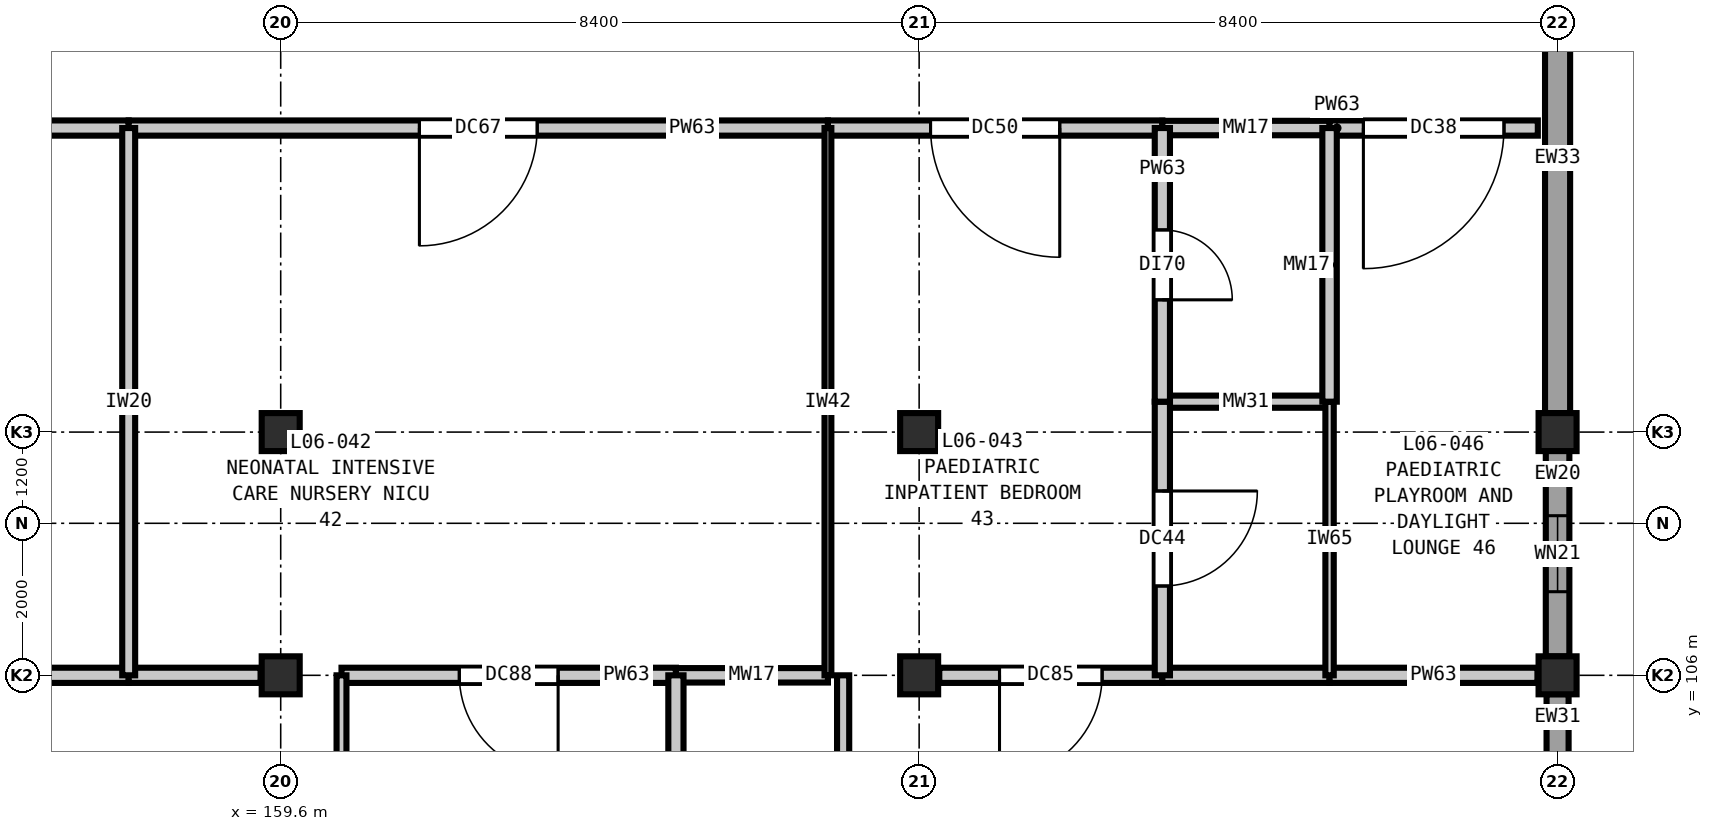
"""IFC4 building model, lengths in metres.
Left out: names, types, materials, properties, quantities, classifications, styles, units other than length and angle.
Written with IfcOpenShell. Run it as: python <this file> out.ifc"""

import sys

from ifc_helpers import new_model, si_unit, direction, frame, frame_2d, origin, origin_2d, place, context, subcontext, project, spatial, rectangle, extrude, element, fill, save


model = new_model("IFC4")
c1 = context("Model", 3, precision=1e-05, world=origin(), true_north=direction((0.0, 1.0)))
c2 = subcontext(c1, "Body", "Model", "MODEL_VIEW")
j1 = project(units=[si_unit("LENGTHUNIT", "METRE"), si_unit("PLANEANGLEUNIT", "RADIAN")], contexts=[c1])
p1 = place(None, origin())
s1 = spatial("IfcSite", under=j1, at=p1, CompositionType="ELEMENT")
p2 = place(p1, origin())
s2 = spatial("IfcBuilding", under=s1, at=p2, CompositionType="ELEMENT")
p3 = place(p2, frame((0.0, 0.0, 28.8)))
s3 = spatial("IfcBuildingStorey", under=s2, at=p3, CompositionType="ELEMENT", Elevation=28.8)
for number, where, z_axis, x_axis in (
    (1, (159.6, 106.0, 0.0), (0.0, 0.0, 1.0), (1.0, 0.0, 0.0)),
    (2, (159.6, 109.2, 0.0), (0.0, 0.0, 1.0), (1.0, 0.0, 0.0)),
    (3, (168.0, 106.0, 0.0), (0.0, 0.0, 1.0), (1.0, 0.0, 0.0)),
    (4, (168.0, 109.2, 0.0), (0.0, 0.0, 1.0), (1.0, 0.0, 0.0)),
    (5, (176.4, 106.0, 0.0), (0.0, 0.0, 1.0), (1.0, 0.0, 0.0)),
    (6, (176.4, 109.2, 0.0), (0.0, 0.0, 1.0), (1.0, 0.0, 0.0)),
):
    element("IfcColumn", number, at=place(p3, frame(where, z_axis=z_axis, x_axis=x_axis)), inside=s3, PredefinedType="COLUMN", context=c2, shape_type="SweptSolid", body=[
        extrude(rectangle(XDim=0.5, YDim=0.5, at=origin_2d()), origin(), (0.0, 0.0, 1.0), 4.2),
    ])
p4 = place(p3, frame((176.4, 116.152, 0.0), z_axis=(0.0, 0.0, 1.0), x_axis=(0.0, -1.0, 0.0)))
e7 = element("IfcWall", 7, at=p4, inside=s3, PredefinedType="SOLIDWALL", context=c2, shape_type="SweptSolid", body=[
    extrude(rectangle(XDim=6.704, YDim=0.33, at=frame_2d((3.352, 0.0))), origin(), (0.0, 0.0, 1.0), 3.48),
])
p5 = place(p3, frame((176.4, 108.952, 0.0), z_axis=(0.0, 0.0, 1.0), x_axis=(0.0, -1.0, 0.0)))
e8 = element("IfcWall", 8, at=p5, inside=s3, PredefinedType="SOLIDWALL", context=c2, shape_type="SweptSolid", body=[
    extrude(rectangle(XDim=2.704, YDim=0.31, at=frame_2d((1.352, 0.0))), origin(), (0.0, 0.0, 1.0), 3.48),
])
p6 = place(p5, frame((0.852, 0.0, 0.9)))
e9 = element("IfcOpeningElement", 9, at=p6, cuts=e8, PredefinedType="OPENING", context=c2, shape_type="SweptSolid", body=[
    extrude(rectangle(XDim=1.0, YDim=1.55, at=frame_2d((0.5, 0.775))), frame((0.0, 0.165, 0.0), z_axis=(0.0, -1.0, 0.0), x_axis=(1.0, 0.0, 0.0)), (0.0, 0.0, 1.0), 0.33),
])
p7 = place(p3, frame((176.4, 105.752, 0.0), z_axis=(0.0, 0.0, 1.0), x_axis=(0.0, -1.0, 0.0)))
e10 = element("IfcWall", 10, at=p7, inside=s3, PredefinedType="SOLIDWALL", context=c2, shape_type="SweptSolid", body=[
    extrude(rectangle(XDim=2.704, YDim=0.29, at=frame_2d((1.352, 0.0))), origin(), (0.0, 0.0, 1.0), 3.48),
])
p8 = place(p7, frame((0.852, 0.0, 0.9)))
e11 = element("IfcOpeningElement", 11, at=p8, cuts=e10, PredefinedType="OPENING", context=c2, shape_type="SweptSolid", body=[
    extrude(rectangle(XDim=1.0, YDim=1.55, at=frame_2d((0.5, 0.775))), frame((0.0, 0.155, 0.0), z_axis=(0.0, -1.0, 0.0), x_axis=(1.0, 0.0, 0.0)), (0.0, 0.0, 1.0), 0.31),
])
p9 = place(p3, frame((151.465, 106.0, 0.0), z_axis=(0.0, 0.0, 1.0), x_axis=(1.0, 0.0, 0.0)))
e12 = element("IfcWall", 12, at=p9, inside=s3, PredefinedType="PARTITIONING", context=c2, shape_type="SweptSolid", body=[
    extrude(rectangle(XDim=6.135, YDim=0.2, at=frame_2d((3.067, 0.0))), origin(), (0.0, 0.0, 1.0), 3.635),
])
p10 = place(p9, frame((2.442, 0.0, 0.0)))
e13 = element("IfcOpeningElement", 13, at=p10, cuts=e12, PredefinedType="OPENING", context=c2, shape_type="SweptSolid", body=[
    extrude(rectangle(XDim=1.25, YDim=2.15, at=frame_2d((0.625, 1.075))), frame((0.0, 0.11, 0.0), z_axis=(0.0, -1.0, 0.0), x_axis=(1.0, 0.0, 0.0)), (0.0, 0.0, 1.0), 0.22),
])
p11 = place(p3, frame((157.6, 106.0, 0.0), z_axis=(0.0, 0.0, 1.0), x_axis=(1.0, 0.0, 0.0)))
e14 = element("IfcWall", 14, at=p11, inside=s3, PredefinedType="PARTITIONING", context=c2, shape_type="SweptSolid", body=[
    extrude(rectangle(XDim=1.735, YDim=0.2, at=frame_2d((0.867, 0.0))), origin(), (0.0, 0.0, 1.0), 3.635),
])
p12 = place(p3, frame((160.4, 106.0, 0.0), z_axis=(0.0, 0.0, 1.0), x_axis=(1.0, 0.0, 0.0)))
e15 = element("IfcWall", 15, at=p12, inside=s3, PredefinedType="PARTITIONING", context=c2, shape_type="SweptSolid", body=[
    extrude(rectangle(XDim=4.4, YDim=0.2, at=frame_2d((2.2, 0.0))), origin(), (0.0, 0.0, 1.0), 3.635),
])
p13 = place(p12, frame((1.55, 0.0, 0.0)))
e16 = element("IfcOpeningElement", 16, at=p13, cuts=e15, PredefinedType="OPENING", context=c2, shape_type="SweptSolid", body=[
    extrude(rectangle(XDim=1.3, YDim=2.2, at=frame_2d((0.65, 1.1))), frame((0.0, 0.11, 0.0), z_axis=(0.0, -1.0, 0.0), x_axis=(1.0, 0.0, 0.0)), (0.0, 0.0, 1.0), 0.22),
])
p14 = place(p3, frame((164.8, 106.0, 0.0), z_axis=(0.0, 0.0, 1.0), x_axis=(1.0, 0.0, 0.0)))
e17 = element("IfcWall", 17, at=p14, inside=s3, PredefinedType="PLUMBINGWALL", context=c2, shape_type="SweptSolid", body=[
    extrude(rectangle(XDim=2.0, YDim=0.19, at=frame_2d((1.0, 0.0))), origin(), (0.0, 0.0, 1.0), 3.635),
])
p15 = place(p3, frame((168.265, 106.0, 0.0), z_axis=(0.0, 0.0, 1.0), x_axis=(1.0, 0.0, 0.0)))
e18 = element("IfcWall", 18, at=p15, inside=s3, PredefinedType="PARTITIONING", context=c2, shape_type="SweptSolid", body=[
    extrude(rectangle(XDim=2.935, YDim=0.2, at=frame_2d((1.468, 0.0))), origin(), (0.0, 0.0, 1.0), 3.635),
])
p16 = place(p15, frame((0.792, 0.0, 0.0)))
e19 = element("IfcOpeningElement", 19, at=p16, cuts=e18, PredefinedType="OPENING", context=c2, shape_type="SweptSolid", body=[
    extrude(rectangle(XDim=1.35, YDim=2.2, at=frame_2d((0.675, 1.1))), frame((0.0, 0.11, 0.0), z_axis=(0.0, -1.0, 0.0), x_axis=(1.0, 0.0, 0.0)), (0.0, 0.0, 1.0), 0.22),
])
p17 = place(p3, frame((171.2, 106.0, 0.0), z_axis=(0.0, 0.0, 1.0), x_axis=(1.0, 0.0, 0.0)))
e20 = element("IfcWall", 20, at=p17, inside=s3, PredefinedType="PARTITIONING", context=c2, shape_type="SweptSolid", body=[
    extrude(rectangle(XDim=2.2, YDim=0.2, at=frame_2d((1.1, 0.0))), origin(), (0.0, 0.0, 1.0), 3.635),
])
p18 = place(p3, frame((173.4, 106.0, 0.0), z_axis=(0.0, 0.0, 1.0), x_axis=(1.0, 0.0, 0.0)))
e21 = element("IfcWall", 21, at=p18, inside=s3, PredefinedType="PARTITIONING", context=c2, shape_type="SweptSolid", body=[
    extrude(rectangle(XDim=2.735, YDim=0.2, at=frame_2d((1.368, 0.0))), origin(), (0.0, 0.0, 1.0), 3.635),
])
p19 = place(p3, frame((171.2, 109.6, 0.0), z_axis=(0.0, 0.0, 1.0), x_axis=(1.0, 0.0, 0.0)))
e22 = element("IfcWall", 22, at=p19, inside=s3, PredefinedType="PLUMBINGWALL", context=c2, shape_type="SweptSolid", body=[
    extrude(rectangle(XDim=2.2, YDim=0.16, at=frame_2d((1.1, 0.0))), origin(), (0.0, 0.0, 1.0), 3.92),
])
p20 = place(p3, frame((149.2, 113.2, 0.0), z_axis=(0.0, 0.0, 1.0), x_axis=(1.0, 0.0, 0.0)))
e23 = element("IfcWall", 23, at=p20, inside=s3, PredefinedType="PARTITIONING", context=c2, shape_type="SweptSolid", body=[
    extrude(rectangle(XDim=8.4, YDim=0.2, at=frame_2d((4.2, 0.0))), origin(), (0.0, 0.0, 1.0), 3.92),
])
p21 = place(p20, frame((3.475, 0.0, 0.0)))
e24 = element("IfcOpeningElement", 24, at=p21, cuts=e23, PredefinedType="OPENING", context=c2, shape_type="SweptSolid", body=[
    extrude(rectangle(XDim=1.45, YDim=2.25, at=frame_2d((0.725, 1.125))), frame((0.0, 0.11, 0.0), z_axis=(0.0, -1.0, 0.0), x_axis=(1.0, 0.0, 0.0)), (0.0, 0.0, 1.0), 0.22),
])
p22 = place(p3, frame((157.6, 113.2, 0.0), z_axis=(0.0, 0.0, 1.0), x_axis=(1.0, 0.0, 0.0)))
e25 = element("IfcWall", 25, at=p22, inside=s3, PredefinedType="PARTITIONING", context=c2, shape_type="SweptSolid", body=[
    extrude(rectangle(XDim=9.2, YDim=0.2, at=frame_2d((4.6, 0.0))), origin(), (0.0, 0.0, 1.0), 3.92),
])
p23 = place(p22, frame((3.825, 0.0, 0.0)))
e26 = element("IfcOpeningElement", 26, at=p23, cuts=e25, PredefinedType="OPENING", context=c2, shape_type="SweptSolid", body=[
    extrude(rectangle(XDim=1.55, YDim=2.25, at=frame_2d((0.775, 1.125))), frame((0.0, 0.11, 0.0), z_axis=(0.0, -1.0, 0.0), x_axis=(1.0, 0.0, 0.0)), (0.0, 0.0, 1.0), 0.22),
])
p24 = place(p3, frame((166.8, 113.2, 0.0), z_axis=(0.0, 0.0, 1.0), x_axis=(1.0, 0.0, 0.0)))
e27 = element("IfcWall", 27, at=p24, inside=s3, PredefinedType="PARTITIONING", context=c2, shape_type="SweptSolid", body=[
    extrude(rectangle(XDim=4.4, YDim=0.2, at=frame_2d((2.2, 0.0))), origin(), (0.0, 0.0, 1.0), 3.92),
])
p25 = place(p24, frame((1.35, 0.0, 0.0)))
e28 = element("IfcOpeningElement", 28, at=p25, cuts=e27, PredefinedType="OPENING", context=c2, shape_type="SweptSolid", body=[
    extrude(rectangle(XDim=1.7, YDim=2.3, at=frame_2d((0.85, 1.15))), frame((0.0, 0.11, 0.0), z_axis=(0.0, -1.0, 0.0), x_axis=(1.0, 0.0, 0.0)), (0.0, 0.0, 1.0), 0.22),
])
p26 = place(p3, frame((171.2, 113.2, 0.0), z_axis=(0.0, 0.0, 1.0), x_axis=(1.0, 0.0, 0.0)))
e29 = element("IfcWall", 29, at=p26, inside=s3, PredefinedType="PLUMBINGWALL", context=c2, shape_type="SweptSolid", body=[
    extrude(rectangle(XDim=2.2, YDim=0.19, at=frame_2d((1.1, 0.0))), origin(), (0.0, 0.0, 1.0), 3.92),
])
p27 = place(p3, frame((173.4, 113.2, 0.0), z_axis=(0.0, 0.0, 1.0), x_axis=(1.0, 0.0, 0.0)))
e30 = element("IfcWall", 30, at=p27, inside=s3, PredefinedType="PARTITIONING", context=c2, shape_type="SweptSolid", body=[
    extrude(rectangle(XDim=2.74, YDim=0.2, at=frame_2d((1.37, 0.0))), origin(), (0.0, 0.0, 1.0), 3.92),
])
p28 = place(p27, frame((0.445, 0.0, 0.0)))
e31 = element("IfcOpeningElement", 31, at=p28, cuts=e30, PredefinedType="OPENING", context=c2, shape_type="SweptSolid", body=[
    extrude(rectangle(XDim=1.85, YDim=2.3, at=frame_2d((0.925, 1.15))), frame((0.0, 0.11, 0.0), z_axis=(0.0, -1.0, 0.0), x_axis=(1.0, 0.0, 0.0)), (0.0, 0.0, 1.0), 0.22),
])
p29 = place(p3, frame((157.6, 106.0, 0.0), z_axis=(0.0, 0.0, 1.0), x_axis=(0.0, 1.0, 0.0)))
e32 = element("IfcWall", 32, at=p29, inside=s3, PredefinedType="PARTITIONING", context=c2, shape_type="SweptSolid", body=[
    extrude(rectangle(XDim=7.2, YDim=0.17, at=frame_2d((3.6, 0.0))), origin(), (0.0, 0.0, 1.0), 3.92),
])
p30 = place(p3, frame((160.4, 91.46, 0.0), z_axis=(0.0, 0.0, 1.0), x_axis=(0.0, 1.0, 0.0)))
e33 = element("IfcWall", 33, at=p30, inside=s3, PredefinedType="PARTITIONING", context=c2, shape_type="SweptSolid", body=[
    extrude(rectangle(XDim=14.54, YDim=0.13, at=frame_2d((7.27, 0.0))), origin(), (0.0, 0.0, 1.0), 3.92),
])
p31 = place(p3, frame((164.8, 98.6, 0.0), z_axis=(0.0, 0.0, 1.0), x_axis=(0.0, 1.0, 0.0)))
e34 = element("IfcWall", 34, at=p31, inside=s3, PredefinedType="PARTITIONING", context=c2, shape_type="SweptSolid", body=[
    extrude(rectangle(XDim=7.4, YDim=0.2, at=frame_2d((3.7, 0.0))), origin(), (0.0, 0.0, 1.0), 3.92),
])
p32 = place(p31, frame((3.24, 0.0, 0.0)))
e35 = element("IfcOpeningElement", 35, at=p32, cuts=e34, PredefinedType="OPENING", context=c2, shape_type="SweptSolid", body=[
    extrude(rectangle(XDim=0.92, YDim=2.1, at=frame_2d((0.46, 1.05))), frame((0.0, 0.11, 0.0), z_axis=(0.0, -1.0, 0.0), x_axis=(1.0, 0.0, 0.0)), (0.0, 0.0, 1.0), 0.22),
])
p33 = place(p3, frame((166.8, 106.0, 0.0), z_axis=(0.0, 0.0, 1.0), x_axis=(0.0, 1.0, 0.0)))
e36 = element("IfcWall", 36, at=p33, inside=s3, PredefinedType="PARTITIONING", context=c2, shape_type="SweptSolid", body=[
    extrude(rectangle(XDim=7.2, YDim=0.09, at=frame_2d((3.6, 0.0))), origin(), (0.0, 0.0, 1.0), 3.92),
])
p34 = place(p3, frame((167.0, 98.6, 0.0), z_axis=(0.0, 0.0, 1.0), x_axis=(0.0, 1.0, 0.0)))
e37 = element("IfcWall", 37, at=p34, inside=s3, PredefinedType="PLUMBINGWALL", context=c2, shape_type="SweptSolid", body=[
    extrude(rectangle(XDim=7.4, YDim=0.16, at=frame_2d((3.7, 0.0))), origin(), (0.0, 0.0, 1.0), 3.92),
])
p35 = place(p3, frame((171.2, 106.0, 0.0), z_axis=(0.0, 0.0, 1.0), x_axis=(0.0, 1.0, 0.0)))
e38 = element("IfcWall", 38, at=p35, inside=s3, PredefinedType="PARTITIONING", context=c2, shape_type="SweptSolid", body=[
    extrude(rectangle(XDim=3.6, YDim=0.2, at=frame_2d((1.8, 0.0))), origin(), (0.0, 0.0, 1.0), 3.92),
])
p36 = place(p35, frame((1.175, 0.0, 0.0)))
e39 = element("IfcOpeningElement", 39, at=p36, cuts=e38, PredefinedType="OPENING", context=c2, shape_type="SweptSolid", body=[
    extrude(rectangle(XDim=1.25, YDim=2.15, at=frame_2d((0.625, 1.075))), frame((0.0, 0.11, 0.0), z_axis=(0.0, -1.0, 0.0), x_axis=(1.0, 0.0, 0.0)), (0.0, 0.0, 1.0), 0.22),
])
p37 = place(p3, frame((171.2, 109.6, 0.0), z_axis=(0.0, 0.0, 1.0), x_axis=(0.0, 1.0, 0.0)))
e40 = element("IfcWall", 40, at=p37, inside=s3, PredefinedType="PARTITIONING", context=c2, shape_type="SweptSolid", body=[
    extrude(rectangle(XDim=3.6, YDim=0.2, at=frame_2d((1.8, 0.0))), origin(), (0.0, 0.0, 1.0), 3.92),
])
p38 = place(p37, frame((1.34, 0.0, 0.0)))
e41 = element("IfcOpeningElement", 41, at=p38, cuts=e40, PredefinedType="OPENING", context=c2, shape_type="SweptSolid", body=[
    extrude(rectangle(XDim=0.92, YDim=2.1, at=frame_2d((0.46, 1.05))), frame((0.0, 0.11, 0.0), z_axis=(0.0, -1.0, 0.0), x_axis=(1.0, 0.0, 0.0)), (0.0, 0.0, 1.0), 0.22),
])
p39 = place(p3, frame((173.4, 106.0, 0.0), z_axis=(0.0, 0.0, 1.0), x_axis=(0.0, 1.0, 0.0)))
e42 = element("IfcWall", 42, at=p39, inside=s3, PredefinedType="PARTITIONING", context=c2, shape_type="SweptSolid", body=[
    extrude(rectangle(XDim=3.6, YDim=0.11, at=frame_2d((1.8, 0.0))), origin(), (0.0, 0.0, 1.0), 3.92),
])
p40 = place(p3, frame((173.4, 109.6, 0.0), z_axis=(0.0, 0.0, 1.0), x_axis=(0.0, 1.0, 0.0)))
e43 = element("IfcWall", 43, at=p40, inside=s3, PredefinedType="PLUMBINGWALL", context=c2, shape_type="SweptSolid", body=[
    extrude(rectangle(XDim=3.6, YDim=0.19, at=frame_2d((1.8, 0.0))), origin(), (0.0, 0.0, 1.0), 3.92),
])
p41 = place(p6, origin())
e44 = element("IfcWindow", 44, at=p41, inside=s3, PartitioningType="SINGLE_PANEL", PredefinedType="WINDOW", context=c2, shape_type="SweptSolid", body=[
    extrude(rectangle(XDim=1.0, YDim=1.55, at=frame_2d((0.5, 0.775))), frame((0.0, 0.03, 0.0), z_axis=(0.0, -1.0, 0.0), x_axis=(1.0, 0.0, 0.0)), (0.0, 0.0, 1.0), 0.06),
])
fill(e9, e44)
p42 = place(p13, frame((1.3, 0.0, 0.0), z_axis=(0.0, 0.0, 1.0), x_axis=(-1.0, 0.0, 0.0)))
e45 = element("IfcDoor", 45, at=p42, inside=s3, OperationType="SINGLE_SWING_LEFT", PredefinedType="DOOR", context=c2, shape_type="SweptSolid", body=[
    extrude(rectangle(XDim=1.3, YDim=2.2, at=frame_2d((0.65, 1.1))), frame((0.0, 0.025, 0.0), z_axis=(0.0, -1.0, 0.0), x_axis=(1.0, 0.0, 0.0)), (0.0, 0.0, 1.0), 0.05),
])
fill(e16, e45)
p43 = place(p16, frame((1.35, 0.0, 0.0), z_axis=(0.0, 0.0, 1.0), x_axis=(-1.0, 0.0, 0.0)))
e46 = element("IfcDoor", 46, at=p43, inside=s3, OperationType="SINGLE_SWING_RIGHT", PredefinedType="DOOR", context=c2, shape_type="SweptSolid", body=[
    extrude(rectangle(XDim=1.35, YDim=2.2, at=frame_2d((0.675, 1.1))), frame((0.0, 0.025, 0.0), z_axis=(0.0, -1.0, 0.0), x_axis=(1.0, 0.0, 0.0)), (0.0, 0.0, 1.0), 0.05),
])
fill(e19, e46)
p44 = place(p23, frame((1.55, 0.0, 0.0), z_axis=(0.0, 0.0, 1.0), x_axis=(-1.0, 0.0, 0.0)))
e47 = element("IfcDoor", 47, at=p44, inside=s3, OperationType="SINGLE_SWING_RIGHT", PredefinedType="DOOR", context=c2, shape_type="SweptSolid", body=[
    extrude(rectangle(XDim=1.55, YDim=2.25, at=frame_2d((0.775, 1.125))), frame((0.0, 0.025, 0.0), z_axis=(0.0, -1.0, 0.0), x_axis=(1.0, 0.0, 0.0)), (0.0, 0.0, 1.0), 0.05),
])
fill(e26, e47)
p45 = place(p25, frame((1.7, 0.0, 0.0), z_axis=(0.0, 0.0, 1.0), x_axis=(-1.0, 0.0, 0.0)))
e48 = element("IfcDoor", 48, at=p45, inside=s3, OperationType="SINGLE_SWING_LEFT", PredefinedType="DOOR", context=c2, shape_type="SweptSolid", body=[
    extrude(rectangle(XDim=1.7, YDim=2.3, at=frame_2d((0.85, 1.15))), frame((0.0, 0.025, 0.0), z_axis=(0.0, -1.0, 0.0), x_axis=(1.0, 0.0, 0.0)), (0.0, 0.0, 1.0), 0.05),
])
fill(e28, e48)
p46 = place(p28, frame((1.85, 0.0, 0.0), z_axis=(0.0, 0.0, 1.0), x_axis=(-1.0, 0.0, 0.0)))
e49 = element("IfcDoor", 49, at=p46, inside=s3, OperationType="SINGLE_SWING_RIGHT", PredefinedType="DOOR", context=c2, shape_type="SweptSolid", body=[
    extrude(rectangle(XDim=1.85, YDim=2.3, at=frame_2d((0.925, 1.15))), frame((0.0, 0.025, 0.0), z_axis=(0.0, -1.0, 0.0), x_axis=(1.0, 0.0, 0.0)), (0.0, 0.0, 1.0), 0.05),
])
fill(e31, e49)
p47 = place(p36, frame((1.25, 0.0, 0.0), z_axis=(0.0, 0.0, 1.0), x_axis=(-1.0, 0.0, 0.0)))
e50 = element("IfcDoor", 50, at=p47, inside=s3, OperationType="SINGLE_SWING_LEFT", PredefinedType="DOOR", context=c2, shape_type="SweptSolid", body=[
    extrude(rectangle(XDim=1.25, YDim=2.15, at=frame_2d((0.625, 1.075))), frame((0.0, 0.025, 0.0), z_axis=(0.0, -1.0, 0.0), x_axis=(1.0, 0.0, 0.0)), (0.0, 0.0, 1.0), 0.05),
])
fill(e39, e50)
p48 = place(p38, frame((0.92, 0.0, 0.0), z_axis=(0.0, 0.0, 1.0), x_axis=(-1.0, 0.0, 0.0)))
e51 = element("IfcDoor", 51, at=p48, inside=s3, OperationType="SINGLE_SWING_RIGHT", PredefinedType="DOOR", context=c2, shape_type="SweptSolid", body=[
    extrude(rectangle(XDim=0.92, YDim=2.1, at=frame_2d((0.46, 1.05))), frame((0.0, 0.025, 0.0), z_axis=(0.0, -1.0, 0.0), x_axis=(1.0, 0.0, 0.0)), (0.0, 0.0, 1.0), 0.05),
])
fill(e41, e51)
save(model, sys.argv[1])
